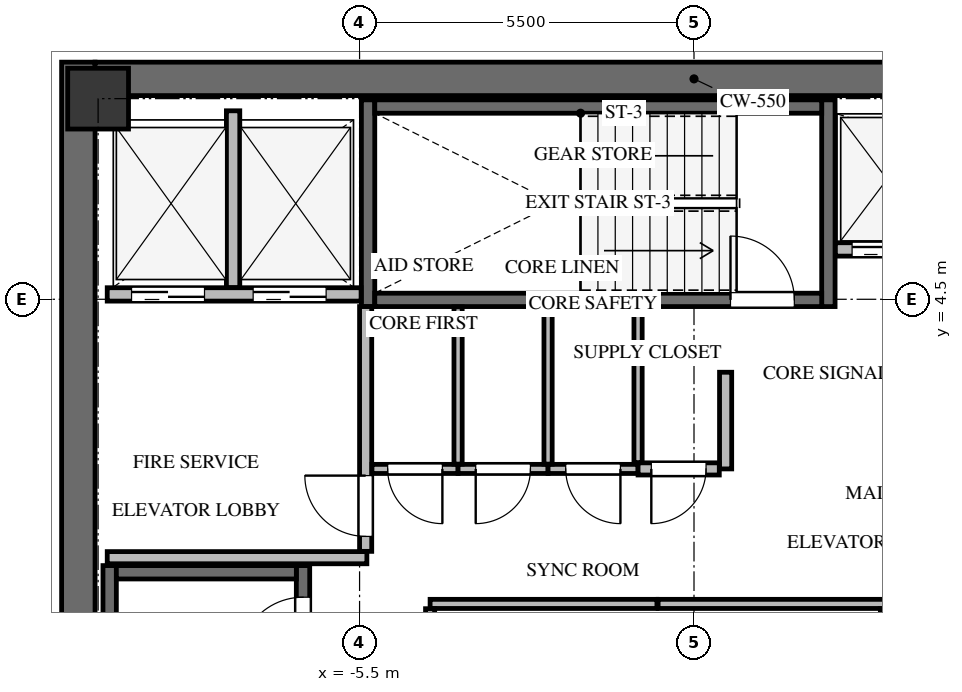
"""IFC4 building model, lengths in metres.
Left out: names, types, materials, properties, quantities, classifications, styles, units other than length and angle.
Written with IfcOpenShell. Run it as: python <this file> out.ifc"""

import sys

from ifc_helpers import new_model, si_unit, direction, frame, frame_2d, origin, origin_2d, place, context, subcontext, project, spatial, rectangle, extrude, source, transform, mapped, element, fill, save


model = new_model("IFC4")
c1 = context("Model", 3, precision=1e-05, world=origin(), true_north=direction((0.0, 1.0)))
c2 = subcontext(c1, "Body", "Model", "MODEL_VIEW")
j1 = project(units=[si_unit("LENGTHUNIT", "METRE"), si_unit("PLANEANGLEUNIT", "RADIAN")], contexts=[c1])
p1 = place(None, origin())
s1 = spatial("IfcSite", under=j1, at=p1, CompositionType="ELEMENT")
p2 = place(p1, origin())
s2 = spatial("IfcBuilding", under=s1, at=p2, CompositionType="ELEMENT")
p3 = place(p2, frame((0.0, 0.0, 234.8)))
s3 = spatial("IfcBuildingStorey", under=s2, at=p3, CompositionType="ELEMENT", Elevation=234.8)
p4 = place(p3, frame((-10.125, -8.4, 0.0), z_axis=(0.0, 0.0, 1.0), x_axis=(0.0, 1.0, 0.0)))
e1 = element("IfcWall", 1, at=p4, inside=s3, PredefinedType="SHEAR", context=c2, shape_type="SweptSolid", body=[
    extrude(rectangle(XDim=16.8, YDim=0.55, at=frame_2d((8.4, 0.0))), origin(), (0.0, 0.0, 1.0), 3.3),
])
p5 = place(p3, frame((-9.85, 8.125, 0.0), z_axis=(0.0, 0.0, 1.0), x_axis=(1.0, 0.0, 0.0)))
e2 = element("IfcWall", 2, at=p5, inside=s3, PredefinedType="SHEAR", context=c2, shape_type="SweptSolid", body=[
    extrude(rectangle(XDim=19.7, YDim=0.55, at=frame_2d((9.85, 0.0))), origin(), (0.0, 0.0, 1.0), 3.3),
])
p6 = place(p3, frame((-6.43, -7.77, -0.24), z_axis=(0.0, 0.0, 1.0), x_axis=(0.0, 1.0, 0.0)))
e3 = element("IfcWall", 3, at=p6, inside=s3, PredefinedType="SHEAR", context=c2, shape_type="SweptSolid", body=[
    extrude(rectangle(XDim=7.89, YDim=0.22, at=frame_2d((3.945, 0.0))), origin(), (0.0, 0.0, 1.0), 3.3),
])
p7 = place(p6, frame((6.32, 0.0, 0.0)))
e4 = element("IfcOpeningElement", 4, at=p7, cuts=e3, PredefinedType="OPENING", context=c2, shape_type="SweptSolid", body=[
    extrude(rectangle(XDim=1.05, YDim=2.15, at=frame_2d((0.525, 1.075))), frame((0.0, 0.12, 0.0), z_axis=(0.0, -1.0, 0.0), x_axis=(1.0, 0.0, 0.0)), (0.0, 0.0, 1.0), 0.24),
])
p8 = place(p3, frame((-9.61, 0.12, -0.24), z_axis=(0.0, 0.0, 1.0), x_axis=(0.0, -1.0, 0.0)))
e5 = element("IfcWall", 5, at=p8, inside=s3, PredefinedType="SHEAR", context=c2, shape_type="SweptSolid", body=[
    extrude(rectangle(XDim=7.89, YDim=0.22, at=frame_2d((3.945, 0.0))), origin(), (0.0, 0.0, 1.0), 3.3),
])
p9 = place(p3, frame((-6.54, 0.01, -0.24), z_axis=(0.0, 0.0, 1.0), x_axis=(-1.0, 0.0, 0.0)))
e6 = element("IfcWall", 6, at=p9, inside=s3, PredefinedType="SHEAR", context=c2, shape_type="SweptSolid", body=[
    extrude(rectangle(XDim=2.96, YDim=0.22, at=frame_2d((1.48, 0.0))), origin(), (0.0, 0.0, 1.0), 3.3),
])
for number, where, z_axis, x_axis in (
    (7, (2.21, 4.38, -0.24), (0.0, 0.0, 1.0), (0.0, 1.0, 0.0)),
    (8, (-5.36, 7.78, -0.24), (0.0, 0.0, 1.0), (0.0, -1.0, 0.0)),
):
    element("IfcWall", number, at=place(p3, frame(where, z_axis=z_axis, x_axis=x_axis)), inside=s3, PredefinedType="SHEAR", context=c2, shape_type="SweptSolid", body=[
        extrude(rectangle(XDim=3.4, YDim=0.22, at=frame_2d((1.7, 0.0))), origin(), (0.0, 0.0, 1.0), 3.3),
    ])
p10 = place(p3, frame((-5.25, 4.49, -0.24), z_axis=(0.0, 0.0, 1.0), x_axis=(1.0, 0.0, 0.0)))
e9 = element("IfcWall", 9, at=p10, inside=s3, PredefinedType="SHEAR", context=c2, shape_type="SweptSolid", body=[
    extrude(rectangle(XDim=7.35, YDim=0.22, at=frame_2d((3.675, 0.0))), origin(), (0.0, 0.0, 1.0), 3.3),
])
p11 = place(p10, frame((5.85, 0.0, 0.0)))
e10 = element("IfcOpeningElement", 10, at=p11, cuts=e9, PredefinedType="OPENING", context=c2, shape_type="SweptSolid", body=[
    extrude(rectangle(XDim=1.05, YDim=2.15, at=frame_2d((0.525, 1.075))), frame((0.0, 0.12, 0.0), z_axis=(0.0, -1.0, 0.0), x_axis=(1.0, 0.0, 0.0)), (0.0, 0.0, 1.0), 0.24),
])
p12 = place(p3, frame((2.1, 7.67, -0.24), z_axis=(0.0, 0.0, 1.0), x_axis=(-1.0, 0.0, 0.0)))
e11 = element("IfcWall", 11, at=p12, inside=s3, PredefinedType="SHEAR", context=c2, shape_type="SweptSolid", body=[
    extrude(rectangle(XDim=7.35, YDim=0.22, at=frame_2d((3.675, 0.0))), origin(), (0.0, 0.0, 1.0), 3.3),
])
m1 = source(origin(), c2, "Body", "SweptSolid", [
    extrude(rectangle(XDim=1.0, YDim=1.0, at=origin_2d()), origin(), (0.0, 0.0, 1.0), 3.3),
])
p13 = place(p3, frame((-9.8, 7.8, -0.24), z_axis=(0.0, 0.0, 1.0), x_axis=(1.0, 0.0, 0.0)))
e12 = element("IfcColumn", 12, at=p13, inside=s3, PredefinedType="COLUMN", context=c2, shape_type="MappedRepresentation", body=[
    mapped(m1, transform((0.0, 0.0, 0.0), x_axis=(1.0, 0.0, 0.0), y_axis=(0.0, 1.0, 0.0), z_axis=(0.0, 0.0, 1.0), scale=1.0)),
])
p14 = place(p3, frame((-9.65, 4.58, 0.0), z_axis=(0.0, 0.0, 1.0), x_axis=(1.0, 0.0, 0.0)))
e13 = element("IfcWall", 13, at=p14, inside=s3, PredefinedType="SOLIDWALL", context=c2, shape_type="SweptSolid", body=[
    extrude(rectangle(XDim=4.175, YDim=0.22, at=frame_2d((2.087, 0.0))), origin(), (0.0, 0.0, 1.0), 3.045),
])
p15 = place(p14, frame((0.4, 0.0, 0.0)))
e14 = element("IfcOpeningElement", 14, at=p15, cuts=e13, PredefinedType="OPENING", context=c2, shape_type="SweptSolid", body=[
    extrude(rectangle(XDim=1.2, YDim=2.15, at=frame_2d((0.6, 1.075))), frame((0.0, 0.12, 0.0), z_axis=(0.0, -1.0, 0.0), x_axis=(1.0, 0.0, 0.0)), (0.0, 0.0, 1.0), 0.24),
])
p16 = place(p14, frame((2.4, 0.0, 0.0)))
e15 = element("IfcOpeningElement", 15, at=p16, cuts=e13, PredefinedType="OPENING", context=c2, shape_type="SweptSolid", body=[
    extrude(rectangle(XDim=1.2, YDim=2.15, at=frame_2d((0.6, 1.075))), frame((0.0, 0.12, 0.0), z_axis=(0.0, -1.0, 0.0), x_axis=(1.0, 0.0, 0.0)), (0.0, 0.0, 1.0), 0.24),
])
p17 = place(p3, frame((-7.58, 4.694, 0.0), z_axis=(0.0, 0.0, 1.0), x_axis=(0.0, 1.0, 0.0)))
e16 = element("IfcWall", 16, at=p17, inside=s3, PredefinedType="SOLIDWALL", context=c2, shape_type="SweptSolid", body=[
    extrude(rectangle(XDim=2.906, YDim=0.22, at=frame_2d((1.453, 0.0))), origin(), (0.0, 0.0, 1.0), 3.045),
])
p18 = place(p3, frame((-9.65, 0.25, 0.0), z_axis=(0.0, 0.0, 1.0), x_axis=(1.0, 0.0, 0.0)))
e17 = element("IfcWall", 17, at=p18, inside=s3, PredefinedType="SOLIDWALL", context=c2, shape_type="SweptSolid", body=[
    extrude(rectangle(XDim=4.27, YDim=0.2, at=frame_2d((2.135, 0.0))), origin(), (0.0, 0.0, 1.0), 3.045),
])
p19 = place(p3, frame((-5.4, 0.354, 0.0), z_axis=(0.0, 0.0, 1.0), x_axis=(0.0, 1.0, 0.0)))
e18 = element("IfcWall", 18, at=p19, inside=s3, PredefinedType="SOLIDWALL", context=c2, shape_type="SweptSolid", body=[
    extrude(rectangle(XDim=4.026, YDim=0.2, at=frame_2d((2.013, 0.0))), origin(), (0.0, 0.0, 1.0), 3.045),
])
p20 = place(p19, frame((0.246, 0.0, 0.0)))
e19 = element("IfcOpeningElement", 19, at=p20, cuts=e18, PredefinedType="OPENING", context=c2, shape_type="SweptSolid", body=[
    extrude(rectangle(XDim=1.0, YDim=2.15, at=frame_2d((0.5, 1.075))), frame((0.0, 0.11, 0.0), z_axis=(0.0, -1.0, 0.0), x_axis=(1.0, 0.0, 0.0)), (0.0, 0.0, 1.0), 0.22),
])
p21 = place(p3, frame((2.325, 5.32, 0.0), z_axis=(0.0, 0.0, 1.0), x_axis=(1.0, 0.0, 0.0)))
e20 = element("IfcWall", 20, at=p21, inside=s3, PredefinedType="SOLIDWALL", context=c2, shape_type="SweptSolid", body=[
    extrude(rectangle(XDim=7.325, YDim=0.22, at=frame_2d((3.663, 0.0))), origin(), (0.0, 0.0, 1.0), 3.045),
])
p22 = place(p21, frame((0.275, 0.0, 0.0)))
e21 = element("IfcOpeningElement", 21, at=p22, cuts=e20, PredefinedType="OPENING", context=c2, shape_type="SweptSolid", body=[
    extrude(rectangle(XDim=1.1, YDim=2.15, at=frame_2d((0.55, 1.075))), frame((0.0, 0.12, 0.0), z_axis=(0.0, -1.0, 0.0), x_axis=(1.0, 0.0, 0.0)), (0.0, 0.0, 1.0), 0.24),
])
p23 = place(p21, frame((2.045, 0.0, 0.0)))
e22 = element("IfcOpeningElement", 22, at=p23, cuts=e20, PredefinedType="OPENING", context=c2, shape_type="SweptSolid", body=[
    extrude(rectangle(XDim=1.1, YDim=2.15, at=frame_2d((0.55, 1.075))), frame((0.0, 0.12, 0.0), z_axis=(0.0, -1.0, 0.0), x_axis=(1.0, 0.0, 0.0)), (0.0, 0.0, 1.0), 0.24),
])
p24 = place(p21, frame((3.815, 0.0, 0.0)))
e23 = element("IfcOpeningElement", 23, at=p24, cuts=e20, PredefinedType="OPENING", context=c2, shape_type="SweptSolid", body=[
    extrude(rectangle(XDim=1.1, YDim=2.15, at=frame_2d((0.55, 1.075))), frame((0.0, 0.12, 0.0), z_axis=(0.0, -1.0, 0.0), x_axis=(1.0, 0.0, 0.0)), (0.0, 0.0, 1.0), 0.24),
])
p25 = place(p21, frame((5.585, 0.0, 0.0)))
e24 = element("IfcOpeningElement", 24, at=p25, cuts=e20, PredefinedType="OPENING", context=c2, shape_type="SweptSolid", body=[
    extrude(rectangle(XDim=1.1, YDim=2.15, at=frame_2d((0.55, 1.075))), frame((0.0, 0.12, 0.0), z_axis=(0.0, -1.0, 0.0), x_axis=(1.0, 0.0, 0.0)), (0.0, 0.0, 1.0), 0.24),
])
p26 = place(p3, frame((-4.34, -0.51, 0.0), z_axis=(0.0, 0.0, 1.0), x_axis=(1.0, 0.0, 0.0)))
e25 = element("IfcWall", 25, at=p26, inside=s3, PredefinedType="PARTITIONING", context=c2, shape_type="SweptSolid", body=[
    extrude(rectangle(XDim=3.73, YDim=0.15, at=frame_2d((1.865, 0.0))), origin(), (0.0, 0.0, 1.0), 3.045),
])
p27 = place(p3, frame((-4.34, -2.961, 0.0), z_axis=(0.0, 0.0, 1.0), x_axis=(0.0, 1.0, 0.0)))
e26 = element("IfcWall", 26, at=p27, inside=s3, PredefinedType="PARTITIONING", context=c2, shape_type="SweptSolid", body=[
    extrude(rectangle(XDim=2.372, YDim=0.15, at=frame_2d((1.186, 0.0))), origin(), (0.0, 0.0, 1.0), 3.045),
])
p28 = place(p3, frame((-0.59, -0.51, 0.0), z_axis=(0.0, 0.0, 1.0), x_axis=(1.0, 0.0, 0.0)))
e27 = element("IfcWall", 27, at=p28, inside=s3, PredefinedType="PARTITIONING", context=c2, shape_type="SweptSolid", body=[
    extrude(rectangle(XDim=3.73, YDim=0.15, at=frame_2d((1.865, 0.0))), origin(), (0.0, 0.0, 1.0), 3.045),
])
p29 = place(p3, frame((3.14, -0.589, 0.0), z_axis=(0.0, 0.0, 1.0), x_axis=(0.0, -1.0, 0.0)))
e28 = element("IfcWall", 28, at=p29, inside=s3, PredefinedType="PARTITIONING", context=c2, shape_type="SweptSolid", body=[
    extrude(rectangle(XDim=2.372, YDim=0.15, at=frame_2d((1.186, 0.0))), origin(), (0.0, 0.0, 1.0), 3.045),
])
p30 = place(p3, frame((-3.88, 1.71, 0.0), z_axis=(0.0, 0.0, 1.0), x_axis=(-1.0, 0.0, 0.0)))
e29 = element("IfcWall", 29, at=p30, inside=s3, PredefinedType="PARTITIONING", context=c2, shape_type="SweptSolid", body=[
    extrude(rectangle(XDim=1.416, YDim=0.15, at=frame_2d((0.708, 0.0))), origin(), (0.0, 0.0, 1.0), 3.045),
])
p31 = place(p30, frame((0.258, 0.0, 0.0)))
e30 = element("IfcOpeningElement", 30, at=p31, cuts=e29, PredefinedType="OPENING", context=c2, shape_type="SweptSolid", body=[
    extrude(rectangle(XDim=0.9, YDim=2.05, at=frame_2d((0.45, 1.025))), frame((0.0, 0.085, 0.0), z_axis=(0.0, -1.0, 0.0), x_axis=(1.0, 0.0, 0.0)), (0.0, 0.0, 1.0), 0.17),
])
p32 = place(p3, frame((-2.4, 1.71, 0.0), z_axis=(0.0, 0.0, 1.0), x_axis=(-1.0, 0.0, 0.0)))
e31 = element("IfcWall", 31, at=p32, inside=s3, PredefinedType="PARTITIONING", context=c2, shape_type="SweptSolid", body=[
    extrude(rectangle(XDim=1.48, YDim=0.15, at=frame_2d((0.74, 0.0))), origin(), (0.0, 0.0, 1.0), 3.045),
])
p33 = place(p32, frame((0.29, 0.0, 0.0)))
e32 = element("IfcOpeningElement", 32, at=p33, cuts=e31, PredefinedType="OPENING", context=c2, shape_type="SweptSolid", body=[
    extrude(rectangle(XDim=0.9, YDim=2.05, at=frame_2d((0.45, 1.025))), frame((0.0, 0.085, 0.0), z_axis=(0.0, -1.0, 0.0), x_axis=(1.0, 0.0, 0.0)), (0.0, 0.0, 1.0), 0.17),
])
p34 = place(p3, frame((-0.92, 1.71, 0.0), z_axis=(0.0, 0.0, 1.0), x_axis=(-1.0, 0.0, 0.0)))
e33 = element("IfcWall", 33, at=p34, inside=s3, PredefinedType="PARTITIONING", context=c2, shape_type="SweptSolid", body=[
    extrude(rectangle(XDim=1.48, YDim=0.15, at=frame_2d((0.74, 0.0))), origin(), (0.0, 0.0, 1.0), 3.045),
])
p35 = place(p34, frame((0.29, 0.0, 0.0)))
e34 = element("IfcOpeningElement", 34, at=p35, cuts=e33, PredefinedType="OPENING", context=c2, shape_type="SweptSolid", body=[
    extrude(rectangle(XDim=0.9, YDim=2.05, at=frame_2d((0.45, 1.025))), frame((0.0, 0.085, 0.0), z_axis=(0.0, -1.0, 0.0), x_axis=(1.0, 0.0, 0.0)), (0.0, 0.0, 1.0), 0.17),
])
p36 = place(p3, frame((0.52, 3.3, 0.0), z_axis=(0.0, 0.0, 1.0), x_axis=(0.0, -1.0, 0.0)))
e35 = element("IfcWall", 35, at=p36, inside=s3, PredefinedType="SOLIDWALL", context=c2, shape_type="SweptSolid", body=[
    extrude(rectangle(XDim=1.59, YDim=0.2, at=frame_2d((0.795, 0.0))), origin(), (0.0, 0.0, 1.0), 3.045),
])
p37 = place(p3, frame((0.416, 1.71, 0.0), z_axis=(0.0, 0.0, 1.0), x_axis=(-1.0, 0.0, 0.0)))
e36 = element("IfcWall", 36, at=p37, inside=s3, PredefinedType="SOLIDWALL", context=c2, shape_type="SweptSolid", body=[
    extrude(rectangle(XDim=1.336, YDim=0.2, at=frame_2d((0.668, 0.0))), origin(), (0.0, 0.0, 1.0), 3.045),
])
p38 = place(p37, frame((0.218, 0.0, 0.0)))
e37 = element("IfcOpeningElement", 37, at=p38, cuts=e36, PredefinedType="OPENING", context=c2, shape_type="SweptSolid", body=[
    extrude(rectangle(XDim=0.9, YDim=2.05, at=frame_2d((0.45, 1.025))), frame((0.0, 0.11, 0.0), z_axis=(0.0, -1.0, 0.0), x_axis=(1.0, 0.0, 0.0)), (0.0, 0.0, 1.0), 0.22),
])
for number, where, z_axis, x_axis in (
    (38, (-3.88, 4.375, 0.0), (0.0, 0.0, 1.0), (0.0, -1.0, 0.0)),
    (39, (-2.4, 4.375, 0.0), (0.0, 0.0, 1.0), (0.0, -1.0, 0.0)),
):
    element("IfcWall", number, at=place(p3, frame(where, z_axis=z_axis, x_axis=x_axis)), inside=s3, PredefinedType="PARTITIONING", context=c2, shape_type="SweptSolid", body=[
        extrude(rectangle(XDim=2.586, YDim=0.135, at=frame_2d((1.293, 0.0))), origin(), (0.0, 0.0, 1.0), 3.045),
    ])
p39 = place(p3, frame((-0.92, 4.375, 0.0), z_axis=(0.0, 0.0, 1.0), x_axis=(0.0, -1.0, 0.0)))
e40 = element("IfcWall", 40, at=p39, inside=s3, PredefinedType="PARTITIONING", context=c2, shape_type="SweptSolid", body=[
    extrude(rectangle(XDim=2.561, YDim=0.135, at=frame_2d((1.281, 0.0))), origin(), (0.0, 0.0, 1.0), 3.045),
])
m2 = source(origin(), c2, "Body", "SweptSolid", [
    extrude(rectangle(XDim=1.05, YDim=2.15, at=frame_2d((0.525, 1.075))), frame((0.0, 0.025, 0.0), z_axis=(0.0, -1.0, 0.0), x_axis=(1.0, 0.0, 0.0)), (0.0, 0.0, 1.0), 0.05),
])
p40 = place(p7, origin())
e41 = element("IfcDoor", 41, at=p40, inside=s3, OperationType="SINGLE_SWING_LEFT", PredefinedType="DOOR", context=c2, shape_type="MappedRepresentation", body=[
    mapped(m2, transform((0.0, 0.0, 0.0), x_axis=(1.0, 0.0, 0.0), y_axis=(0.0, 1.0, 0.0), z_axis=(0.0, 0.0, 1.0), scale=1.0)),
])
fill(e4, e41)
p41 = place(p11, origin())
e42 = element("IfcDoor", 42, at=p41, inside=s3, OperationType="SINGLE_SWING_LEFT", PredefinedType="DOOR", context=c2, shape_type="MappedRepresentation", body=[
    mapped(m2, transform((0.0, 0.0, 0.0), x_axis=(1.0, 0.0, 0.0), y_axis=(0.0, 1.0, 0.0), z_axis=(0.0, 0.0, 1.0), scale=1.0)),
])
fill(e10, e42)
m3 = source(origin(), c2, "Body", "SweptSolid", [
    extrude(rectangle(XDim=1.2, YDim=2.15, at=frame_2d((0.6, 1.075))), frame((0.0, 0.025, 0.0), z_axis=(0.0, -1.0, 0.0), x_axis=(1.0, 0.0, 0.0)), (0.0, 0.0, 1.0), 0.05),
])
p42 = place(p15, origin())
e43 = element("IfcDoor", 43, at=p42, inside=s3, OperationType="DOUBLE_DOOR_SLIDING", PredefinedType="DOOR", context=c2, shape_type="MappedRepresentation", body=[
    mapped(m3, transform((0.0, 0.0, 0.0), x_axis=(1.0, 0.0, 0.0), y_axis=(0.0, 1.0, 0.0), z_axis=(0.0, 0.0, 1.0), scale=1.0)),
])
fill(e14, e43)
p43 = place(p16, origin())
e44 = element("IfcDoor", 44, at=p43, inside=s3, OperationType="DOUBLE_DOOR_SLIDING", PredefinedType="DOOR", context=c2, shape_type="MappedRepresentation", body=[
    mapped(m3, transform((0.0, 0.0, 0.0), x_axis=(1.0, 0.0, 0.0), y_axis=(0.0, 1.0, 0.0), z_axis=(0.0, 0.0, 1.0), scale=1.0)),
])
fill(e15, e44)
m4 = source(origin(), c2, "Body", "SweptSolid", [
    extrude(rectangle(XDim=1.0, YDim=2.15, at=frame_2d((0.5, 1.075))), frame((0.0, 0.025, 0.0), z_axis=(0.0, -1.0, 0.0), x_axis=(1.0, 0.0, 0.0)), (0.0, 0.0, 1.0), 0.05),
])
p44 = place(p20, origin())
e45 = element("IfcDoor", 45, at=p44, inside=s3, OperationType="SINGLE_SWING_RIGHT", PredefinedType="DOOR", context=c2, shape_type="MappedRepresentation", body=[
    mapped(m4, transform((0.0, 0.0, 0.0), x_axis=(1.0, 0.0, 0.0), y_axis=(0.0, 1.0, 0.0), z_axis=(0.0, 0.0, 1.0), scale=1.0)),
])
fill(e19, e45)
m5 = source(origin(), c2, "Body", "SweptSolid", [
    extrude(rectangle(XDim=1.1, YDim=2.15, at=frame_2d((0.55, 1.075))), frame((0.0, 0.025, 0.0), z_axis=(0.0, -1.0, 0.0), x_axis=(1.0, 0.0, 0.0)), (0.0, 0.0, 1.0), 0.05),
])
p45 = place(p22, origin())
e46 = element("IfcDoor", 46, at=p45, inside=s3, OperationType="DOUBLE_DOOR_SLIDING", PredefinedType="DOOR", context=c2, shape_type="MappedRepresentation", body=[
    mapped(m5, transform((0.0, 0.0, 0.0), x_axis=(1.0, 0.0, 0.0), y_axis=(0.0, 1.0, 0.0), z_axis=(0.0, 0.0, 1.0), scale=1.0)),
])
fill(e21, e46)
m6 = source(origin(), c2, "Body", "SweptSolid", [
    extrude(rectangle(XDim=0.9, YDim=2.05, at=frame_2d((0.45, 1.025))), frame((0.0, 0.025, 0.0), z_axis=(0.0, -1.0, 0.0), x_axis=(1.0, 0.0, 0.0)), (0.0, 0.0, 1.0), 0.05),
])
p46 = place(p31, origin())
e47 = element("IfcDoor", 47, at=p46, inside=s3, OperationType="SINGLE_SWING_LEFT", PredefinedType="DOOR", context=c2, shape_type="MappedRepresentation", body=[
    mapped(m6, transform((0.0, 0.0, 0.0), x_axis=(1.0, 0.0, 0.0), y_axis=(0.0, 1.0, 0.0), z_axis=(0.0, 0.0, 1.0), scale=1.0)),
])
fill(e30, e47)
m7 = source(origin(), c2, "Body", "SweptSolid", [
    extrude(rectangle(XDim=0.9, YDim=2.05, at=frame_2d((0.45, 1.025))), frame((0.0, 0.025, 0.0), z_axis=(0.0, -1.0, 0.0), x_axis=(1.0, 0.0, 0.0)), (0.0, 0.0, 1.0), 0.05),
])
p47 = place(p33, origin())
e48 = element("IfcDoor", 48, at=p47, inside=s3, OperationType="SINGLE_SWING_RIGHT", PredefinedType="DOOR", context=c2, shape_type="MappedRepresentation", body=[
    mapped(m7, transform((0.0, 0.0, 0.0), x_axis=(1.0, 0.0, 0.0), y_axis=(0.0, 1.0, 0.0), z_axis=(0.0, 0.0, 1.0), scale=1.0)),
])
fill(e32, e48)
p48 = place(p35, origin())
e49 = element("IfcDoor", 49, at=p48, inside=s3, OperationType="SINGLE_SWING_LEFT", PredefinedType="DOOR", context=c2, shape_type="MappedRepresentation", body=[
    mapped(m6, transform((0.0, 0.0, 0.0), x_axis=(1.0, 0.0, 0.0), y_axis=(0.0, 1.0, 0.0), z_axis=(0.0, 0.0, 1.0), scale=1.0)),
])
fill(e34, e49)
p49 = place(p38, origin())
e50 = element("IfcDoor", 50, at=p49, inside=s3, OperationType="SINGLE_SWING_RIGHT", PredefinedType="DOOR", context=c2, shape_type="MappedRepresentation", body=[
    mapped(m7, transform((0.0, 0.0, 0.0), x_axis=(1.0, 0.0, 0.0), y_axis=(0.0, 1.0, 0.0), z_axis=(0.0, 0.0, 1.0), scale=1.0)),
])
fill(e37, e50)
save(model, sys.argv[1])
